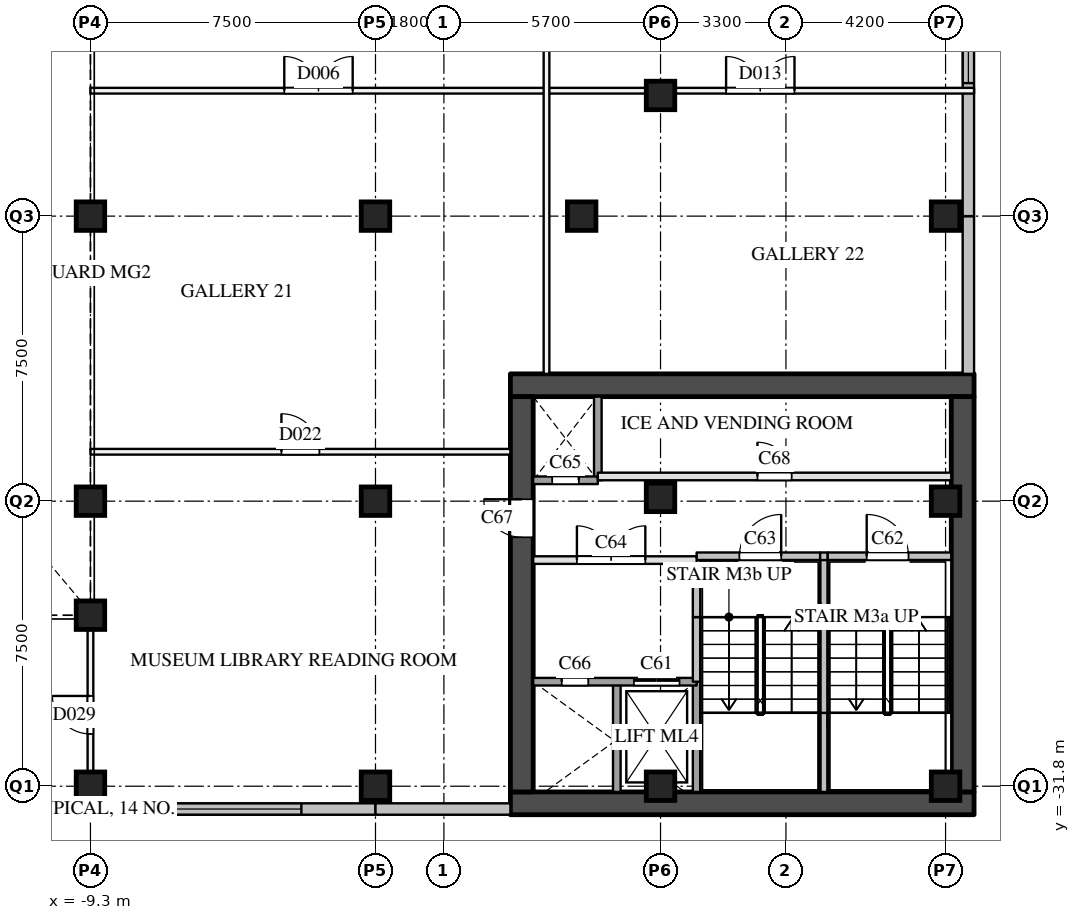
"""IFC4 building model, lengths in metres.
Left out: names, types, materials, properties, quantities, classifications, styles, units other than length and angle.
Written with IfcOpenShell. Run it as: python <this file> out.ifc"""

import sys

from ifc_helpers import new_model, si_unit, direction, frame, frame_2d, origin, origin_2d, place, context, subcontext, project, spatial, rectangle, extrude, element, fill, save


model = new_model("IFC4")
c1 = context("Model", 3, precision=1e-05, world=origin(), true_north=direction((0.0, 1.0)))
c2 = subcontext(c1, "Body", "Model", "MODEL_VIEW")
j1 = project(units=[si_unit("LENGTHUNIT", "METRE"), si_unit("PLANEANGLEUNIT", "RADIAN")], contexts=[c1])
p1 = place(None, origin())
s1 = spatial("IfcSite", under=j1, at=p1, CompositionType="ELEMENT")
p2 = place(p1, origin())
s2 = spatial("IfcBuilding", under=s1, at=p2, CompositionType="ELEMENT")
p3 = place(p2, frame((0.0, 0.0, 21.0)))
s3 = spatial("IfcBuildingStorey", under=s2, at=p3, CompositionType="ELEMENT", Elevation=21.0)
for number, where, z_axis, x_axis in (
    (1, (-9.3, -31.8, 0.0), (0.0, 0.0, 1.0), (1.0, 0.0, 0.0)),
    (2, (-9.3, -24.3, 0.0), (0.0, 0.0, 1.0), (1.0, 0.0, 0.0)),
    (3, (-9.3, -16.8, 0.0), (0.0, 0.0, 1.0), (1.0, 0.0, 0.0)),
    (4, (-1.8, -31.8, 0.0), (0.0, 0.0, 1.0), (1.0, 0.0, 0.0)),
    (5, (-1.8, -24.3, 0.0), (0.0, 0.0, 1.0), (1.0, 0.0, 0.0)),
    (6, (-1.8, -16.8, 0.0), (0.0, 0.0, 1.0), (1.0, 0.0, 0.0)),
    (7, (5.7, -31.8, 0.0), (0.0, 0.0, 1.0), (1.0, 0.0, 0.0)),
    (8, (5.7, -24.2, 0.0), (0.0, 0.0, 1.0), (1.0, 0.0, 0.0)),
    (9, (13.2, -31.8, 0.0), (0.0, 0.0, 1.0), (1.0, 0.0, 0.0)),
    (10, (13.2, -24.3, 0.0), (0.0, 0.0, 1.0), (1.0, 0.0, 0.0)),
    (11, (13.2, -16.8, 0.0), (0.0, 0.0, 1.0), (1.0, 0.0, 0.0)),
    (12, (-9.3, -27.3, 0.0), (0.0, 0.0, 1.0), (1.0, 0.0, 0.0)),
    (13, (3.625, -16.8, 0.0), (0.0, 0.0, 1.0), (1.0, 0.0, 0.0)),
    (14, (5.7, -13.625, 0.0), (0.0, 0.0, 1.0), (1.0, 0.0, 0.0)),
):
    element("IfcColumn", number, at=place(p3, frame(where, z_axis=z_axis, x_axis=x_axis)), inside=s3, PredefinedType="COLUMN", context=c2, shape_type="SweptSolid", body=[
        extrude(rectangle(XDim=0.75, YDim=0.75, at=origin_2d()), origin(), (0.0, 0.0, 1.0), 5.0),
    ])
p4 = place(p3, frame((-16.8, -32.4, 0.0), z_axis=(0.0, 0.0, 1.0), x_axis=(1.0, 0.0, 0.0)))
e15 = element("IfcWall", 15, at=p4, inside=s3, PredefinedType="SOLIDWALL", context=c2, shape_type="SweptSolid", body=[
    extrude(rectangle(XDim=7.5, YDim=0.3, at=frame_2d((3.75, 0.0))), origin(), (0.0, 0.0, 1.0), 4.59),
])
p5 = place(p4, frame((1.95, 0.0, 2.4)))
e16 = element("IfcOpeningElement", 16, at=p5, cuts=e15, PredefinedType="OPENING", context=c2, shape_type="SweptSolid", body=[
    extrude(rectangle(XDim=3.6, YDim=1.2, at=frame_2d((1.8, 0.6))), frame((0.0, 0.16, 0.0), z_axis=(0.0, -1.0, 0.0), x_axis=(1.0, 0.0, 0.0)), (0.0, 0.0, 1.0), 0.32),
])
p6 = place(p3, frame((-9.3, -32.4, 0.0), z_axis=(0.0, 0.0, 1.0), x_axis=(1.0, 0.0, 0.0)))
e17 = element("IfcWall", 17, at=p6, inside=s3, PredefinedType="SOLIDWALL", context=c2, shape_type="SweptSolid", body=[
    extrude(rectangle(XDim=7.5, YDim=0.3, at=frame_2d((3.75, 0.0))), origin(), (0.0, 0.0, 1.0), 4.59),
])
p7 = place(p6, frame((1.95, 0.0, 2.4)))
e18 = element("IfcOpeningElement", 18, at=p7, cuts=e17, PredefinedType="OPENING", context=c2, shape_type="SweptSolid", body=[
    extrude(rectangle(XDim=3.6, YDim=1.2, at=frame_2d((1.8, 0.6))), frame((0.0, 0.16, 0.0), z_axis=(0.0, -1.0, 0.0), x_axis=(1.0, 0.0, 0.0)), (0.0, 0.0, 1.0), 0.32),
])
p8 = place(p3, frame((-1.8, -32.4, 0.0), z_axis=(0.0, 0.0, 1.0), x_axis=(1.0, 0.0, 0.0)))
e19 = element("IfcWall", 19, at=p8, inside=s3, PredefinedType="SOLIDWALL", context=c2, shape_type="SweptSolid", body=[
    extrude(rectangle(XDim=3.55, YDim=0.3, at=frame_2d((1.775, 0.0))), origin(), (0.0, 0.0, 1.0), 4.59),
])
p9 = place(p3, frame((13.8, -20.95, 0.0), z_axis=(0.0, 0.0, 1.0), x_axis=(0.0, 1.0, 0.0)))
e20 = element("IfcWall", 20, at=p9, inside=s3, PredefinedType="SOLIDWALL", context=c2, shape_type="SweptSolid", body=[
    extrude(rectangle(XDim=4.15, YDim=0.3, at=frame_2d((2.075, 0.0))), origin(), (0.0, 0.0, 1.0), 4.59),
])
p10 = place(p3, frame((13.8, -16.8, 0.0), z_axis=(0.0, 0.0, 1.0), x_axis=(0.0, 1.0, 0.0)))
e21 = element("IfcWall", 21, at=p10, inside=s3, PredefinedType="SOLIDWALL", context=c2, shape_type="SweptSolid", body=[
    extrude(rectangle(XDim=7.5, YDim=0.3, at=frame_2d((3.75, 0.0))), origin(), (0.0, 0.0, 1.0), 4.59),
])
p11 = place(p10, frame((3.5, 0.0, 2.4)))
e22 = element("IfcOpeningElement", 22, at=p11, cuts=e21, PredefinedType="OPENING", context=c2, shape_type="SweptSolid", body=[
    extrude(rectangle(XDim=3.6, YDim=1.2, at=frame_2d((1.8, 0.6))), frame((0.0, 0.16, 0.0), z_axis=(0.0, -1.0, 0.0), x_axis=(1.0, 0.0, 0.0)), (0.0, 0.0, 1.0), 0.32),
])
for number, where, z_axis, x_axis in (
    (23, (1.75, -32.25, 0.0), (0.0, 0.0, 1.0), (1.0, 0.0, 0.0)),
    (24, (1.75, -21.25, 0.0), (0.0, 0.0, 1.0), (1.0, 0.0, 0.0)),
):
    element("IfcWall", number, at=place(p3, frame(where, z_axis=z_axis, x_axis=x_axis)), inside=s3, PredefinedType="SHEAR", context=c2, shape_type="SweptSolid", body=[
        extrude(rectangle(XDim=12.2, YDim=0.6, at=frame_2d((6.1, 0.0))), origin(), (0.0, 0.0, 1.0), 4.55),
    ])
p12 = place(p3, frame((2.05, -31.95, 0.0), z_axis=(0.0, 0.0, 1.0), x_axis=(0.0, 1.0, 0.0)))
e25 = element("IfcWall", 25, at=p12, inside=s3, PredefinedType="SHEAR", context=c2, shape_type="SweptSolid", body=[
    extrude(rectangle(XDim=10.4, YDim=0.6, at=frame_2d((5.2, 0.0))), origin(), (0.0, 0.0, 1.0), 4.55),
])
p13 = place(p12, frame((6.7, 0.0, 0.0)))
e26 = element("IfcOpeningElement", 26, at=p13, cuts=e25, PredefinedType="OPENING", context=c2, shape_type="SweptSolid", body=[
    extrude(rectangle(XDim=1.0, YDim=2.1, at=frame_2d((0.5, 1.05))), frame((0.0, 0.31, 0.0), z_axis=(0.0, -1.0, 0.0), x_axis=(1.0, 0.0, 0.0)), (0.0, 0.0, 1.0), 0.62),
])
p14 = place(p3, frame((13.65, -31.95, 0.0), z_axis=(0.0, 0.0, 1.0), x_axis=(0.0, 1.0, 0.0)))
e27 = element("IfcWall", 27, at=p14, inside=s3, PredefinedType="SHEAR", context=c2, shape_type="SweptSolid", body=[
    extrude(rectangle(XDim=10.4, YDim=0.6, at=frame_2d((5.2, 0.0))), origin(), (0.0, 0.0, 1.0), 4.55),
])
p15 = place(p3, frame((4.05, -23.75, 0.0), z_axis=(0.0, 0.0, 1.0), x_axis=(0.0, 1.0, 0.0)))
e28 = element("IfcWall", 28, at=p15, inside=s3, PredefinedType="SOLIDWALL", context=c2, shape_type="SweptSolid", body=[
    extrude(rectangle(XDim=2.2, YDim=0.2, at=frame_2d((1.1, 0.0))), origin(), (0.0, 0.0, 1.0), 4.55),
])
for number, where, z_axis, x_axis in (
    (29, (4.55, -31.95, 0.0), (0.0, 0.0, 1.0), (0.0, 1.0, 0.0)),
    (30, (6.65, -31.95, 0.0), (0.0, 0.0, 1.0), (0.0, 1.0, 0.0)),
):
    element("IfcWall", number, at=place(p3, frame(where, z_axis=z_axis, x_axis=x_axis)), inside=s3, PredefinedType="SOLIDWALL", context=c2, shape_type="SweptSolid", body=[
        extrude(rectangle(XDim=2.9, YDim=0.2, at=frame_2d((1.45, 0.0))), origin(), (0.0, 0.0, 1.0), 4.55),
    ])
p16 = place(p3, frame((6.65, -29.05, 0.0), z_axis=(0.0, 0.0, 1.0), x_axis=(0.0, 1.0, 0.0)))
e31 = element("IfcWall", 31, at=p16, inside=s3, PredefinedType="SOLIDWALL", context=c2, shape_type="SweptSolid", body=[
    extrude(rectangle(XDim=1.7, YDim=0.2, at=frame_2d((0.85, 0.0))), origin(), (0.0, 0.0, 1.0), 4.55),
])
p17 = place(p3, frame((6.65, -27.35, 0.0), z_axis=(0.0, 0.0, 1.0), x_axis=(0.0, 1.0, 0.0)))
e32 = element("IfcWall", 32, at=p17, inside=s3, PredefinedType="SOLIDWALL", context=c2, shape_type="SweptSolid", body=[
    extrude(rectangle(XDim=1.6, YDim=0.2, at=frame_2d((0.8, 0.0))), origin(), (0.0, 0.0, 1.0), 4.55),
])
p18 = place(p3, frame((10.0, -31.95, 0.0), z_axis=(0.0, 0.0, 1.0), x_axis=(0.0, 1.0, 0.0)))
e33 = element("IfcWall", 33, at=p18, inside=s3, PredefinedType="SOLIDWALL", context=c2, shape_type="SweptSolid", body=[
    extrude(rectangle(XDim=2.08, YDim=0.2, at=frame_2d((1.04, 0.0))), origin(), (0.0, 0.0, 1.0), 4.55),
])
p19 = place(p3, frame((10.0, -29.87, 0.0), z_axis=(0.0, 0.0, 1.0), x_axis=(0.0, 1.0, 0.0)))
e34 = element("IfcWall", 34, at=p19, inside=s3, PredefinedType="SOLIDWALL", context=c2, shape_type="SweptSolid", body=[
    extrude(rectangle(XDim=2.52, YDim=0.2, at=frame_2d((1.26, 0.0))), origin(), (0.0, 0.0, 1.0), 4.55),
])
p20 = place(p3, frame((10.0, -27.35, 0.0), z_axis=(0.0, 0.0, 1.0), x_axis=(0.0, 1.0, 0.0)))
e35 = element("IfcWall", 35, at=p20, inside=s3, PredefinedType="SOLIDWALL", context=c2, shape_type="SweptSolid", body=[
    extrude(rectangle(XDim=1.6, YDim=0.2, at=frame_2d((0.8, 0.0))), origin(), (0.0, 0.0, 1.0), 4.55),
])
p21 = place(p3, frame((2.35, -29.05, 0.0), z_axis=(0.0, 0.0, 1.0), x_axis=(1.0, 0.0, 0.0)))
e36 = element("IfcWall", 36, at=p21, inside=s3, PredefinedType="SOLIDWALL", context=c2, shape_type="SweptSolid", body=[
    extrude(rectangle(XDim=4.3, YDim=0.2, at=frame_2d((2.15, 0.0))), origin(), (0.0, 0.0, 1.0), 4.55),
])
p22 = place(p21, frame((2.65, 0.0, 0.0)))
e37 = element("IfcOpeningElement", 37, at=p22, cuts=e36, PredefinedType="OPENING", context=c2, shape_type="SweptSolid", body=[
    extrude(rectangle(XDim=1.2, YDim=2.1, at=frame_2d((0.6, 1.05))), frame((0.0, 0.11, 0.0), z_axis=(0.0, -1.0, 0.0), x_axis=(1.0, 0.0, 0.0)), (0.0, 0.0, 1.0), 0.22),
])
p23 = place(p21, frame((0.75, 0.0, 0.0)))
e38 = element("IfcOpeningElement", 38, at=p23, cuts=e36, PredefinedType="OPENING", context=c2, shape_type="SweptSolid", body=[
    extrude(rectangle(XDim=0.7, YDim=2.1, at=frame_2d((0.35, 1.05))), frame((0.0, 0.11, 0.0), z_axis=(0.0, -1.0, 0.0), x_axis=(1.0, 0.0, 0.0)), (0.0, 0.0, 1.0), 0.22),
])
p24 = place(p3, frame((2.35, -25.85, 0.0), z_axis=(0.0, 0.0, 1.0), x_axis=(1.0, 0.0, 0.0)))
e39 = element("IfcWall", 39, at=p24, inside=s3, PredefinedType="PARTITIONING", context=c2, shape_type="SweptSolid", body=[
    extrude(rectangle(XDim=4.3, YDim=0.2, at=frame_2d((2.15, 0.0))), origin(), (0.0, 0.0, 1.0), 4.55),
])
p25 = place(p24, frame((1.15, 0.0, 0.0)))
e40 = element("IfcOpeningElement", 40, at=p25, cuts=e39, PredefinedType="OPENING", context=c2, shape_type="SweptSolid", body=[
    extrude(rectangle(XDim=1.8, YDim=2.1, at=frame_2d((0.9, 1.05))), frame((0.0, 0.11, 0.0), z_axis=(0.0, -1.0, 0.0), x_axis=(1.0, 0.0, 0.0)), (0.0, 0.0, 1.0), 0.22),
])
p26 = place(p3, frame((6.65, -25.75, 0.0), z_axis=(0.0, 0.0, 1.0), x_axis=(1.0, 0.0, 0.0)))
e41 = element("IfcWall", 41, at=p26, inside=s3, PredefinedType="SOLIDWALL", context=c2, shape_type="SweptSolid", body=[
    extrude(rectangle(XDim=3.25, YDim=0.2, at=frame_2d((1.625, 0.0))), origin(), (0.0, 0.0, 1.0), 4.55),
])
p27 = place(p26, frame((1.125, 0.0, 0.0)))
e42 = element("IfcOpeningElement", 42, at=p27, cuts=e41, PredefinedType="OPENING", context=c2, shape_type="SweptSolid", body=[
    extrude(rectangle(XDim=1.1, YDim=2.1, at=frame_2d((0.55, 1.05))), frame((0.0, 0.11, 0.0), z_axis=(0.0, -1.0, 0.0), x_axis=(1.0, 0.0, 0.0)), (0.0, 0.0, 1.0), 0.22),
])
p28 = place(p3, frame((9.9, -25.75, 0.0), z_axis=(0.0, 0.0, 1.0), x_axis=(1.0, 0.0, 0.0)))
e43 = element("IfcWall", 43, at=p28, inside=s3, PredefinedType="SOLIDWALL", context=c2, shape_type="SweptSolid", body=[
    extrude(rectangle(XDim=0.2, YDim=0.2, at=frame_2d((0.1, 0.0))), origin(), (0.0, 0.0, 1.0), 4.55),
])
p29 = place(p3, frame((10.1, -25.75, 0.0), z_axis=(0.0, 0.0, 1.0), x_axis=(1.0, 0.0, 0.0)))
e44 = element("IfcWall", 44, at=p29, inside=s3, PredefinedType="SOLIDWALL", context=c2, shape_type="SweptSolid", body=[
    extrude(rectangle(XDim=3.25, YDim=0.2, at=frame_2d((1.625, 0.0))), origin(), (0.0, 0.0, 1.0), 4.55),
])
p30 = place(p29, frame((1.025, 0.0, 0.0)))
e45 = element("IfcOpeningElement", 45, at=p30, cuts=e44, PredefinedType="OPENING", context=c2, shape_type="SweptSolid", body=[
    extrude(rectangle(XDim=1.1, YDim=2.1, at=frame_2d((0.55, 1.05))), frame((0.0, 0.11, 0.0), z_axis=(0.0, -1.0, 0.0), x_axis=(1.0, 0.0, 0.0)), (0.0, 0.0, 1.0), 0.22),
])
p31 = place(p3, frame((4.05, -23.65, 0.0), z_axis=(0.0, 0.0, 1.0), x_axis=(1.0, 0.0, 0.0)))
e46 = element("IfcWall", 46, at=p31, inside=s3, PredefinedType="PARTITIONING", context=c2, shape_type="SweptSolid", body=[
    extrude(rectangle(XDim=9.3, YDim=0.2, at=frame_2d((4.65, 0.0))), origin(), (0.0, 0.0, 1.0), 4.55),
])
p32 = place(p31, frame((4.2, 0.0, 0.0)))
e47 = element("IfcOpeningElement", 47, at=p32, cuts=e46, PredefinedType="OPENING", context=c2, shape_type="SweptSolid", body=[
    extrude(rectangle(XDim=0.9, YDim=2.1, at=frame_2d((0.45, 1.05))), frame((0.0, 0.11, 0.0), z_axis=(0.0, -1.0, 0.0), x_axis=(1.0, 0.0, 0.0)), (0.0, 0.0, 1.0), 0.22),
])
p33 = place(p3, frame((2.35, -23.75, 0.0), z_axis=(0.0, 0.0, 1.0), x_axis=(1.0, 0.0, 0.0)))
e48 = element("IfcWall", 48, at=p33, inside=s3, PredefinedType="SOLIDWALL", context=c2, shape_type="SweptSolid", body=[
    extrude(rectangle(XDim=1.7, YDim=0.2, at=frame_2d((0.85, 0.0))), origin(), (0.0, 0.0, 1.0), 4.55),
])
p34 = place(p33, frame((0.5, 0.0, 0.0)))
e49 = element("IfcOpeningElement", 49, at=p34, cuts=e48, PredefinedType="OPENING", context=c2, shape_type="SweptSolid", body=[
    extrude(rectangle(XDim=0.7, YDim=2.1, at=frame_2d((0.35, 1.05))), frame((0.0, 0.11, 0.0), z_axis=(0.0, -1.0, 0.0), x_axis=(1.0, 0.0, 0.0)), (0.0, 0.0, 1.0), 0.22),
])
p35 = place(p3, frame((-9.3, -13.5, 0.0), z_axis=(0.0, 0.0, 1.0), x_axis=(1.0, 0.0, 0.0)))
e50 = element("IfcWall", 50, at=p35, inside=s3, PredefinedType="PARTITIONING", context=c2, shape_type="SweptSolid", body=[
    extrude(rectangle(XDim=23.25, YDim=0.15, at=frame_2d((11.625, 0.0))), origin(), (0.0, 0.0, 1.0), 3.79),
])
p36 = place(p35, frame((5.1, 0.0, 0.0)))
e51 = element("IfcOpeningElement", 51, at=p36, cuts=e50, PredefinedType="OPENING", context=c2, shape_type="SweptSolid", body=[
    extrude(rectangle(XDim=1.8, YDim=2.1, at=frame_2d((0.9, 1.05))), frame((0.0, 0.085, 0.0), z_axis=(0.0, -1.0, 0.0), x_axis=(1.0, 0.0, 0.0)), (0.0, 0.0, 1.0), 0.17),
])
p37 = place(p35, frame((16.725, 0.0, 0.0)))
e52 = element("IfcOpeningElement", 52, at=p37, cuts=e50, PredefinedType="OPENING", context=c2, shape_type="SweptSolid", body=[
    extrude(rectangle(XDim=1.8, YDim=2.1, at=frame_2d((0.9, 1.05))), frame((0.0, 0.085, 0.0), z_axis=(0.0, -1.0, 0.0), x_axis=(1.0, 0.0, 0.0)), (0.0, 0.0, 1.0), 0.17),
])
p38 = place(p3, frame((2.7, -20.95, 0.0), z_axis=(0.0, 0.0, 1.0), x_axis=(0.0, 1.0, 0.0)))
e53 = element("IfcWall", 53, at=p38, inside=s3, PredefinedType="PARTITIONING", context=c2, shape_type="SweptSolid", body=[
    extrude(rectangle(XDim=16.9, YDim=0.15, at=frame_2d((8.45, 0.0))), origin(), (0.0, 0.0, 1.0), 3.79),
])
p39 = place(p3, frame((-9.3, -23.0, 0.0), z_axis=(0.0, 0.0, 1.0), x_axis=(1.0, 0.0, 0.0)))
e54 = element("IfcWall", 54, at=p39, inside=s3, PredefinedType="PARTITIONING", context=c2, shape_type="SweptSolid", body=[
    extrude(rectangle(XDim=11.05, YDim=0.15, at=frame_2d((5.525, 0.0))), origin(), (0.0, 0.0, 1.0), 3.79),
])
p40 = place(p39, frame((5.025, 0.0, 0.0)))
e55 = element("IfcOpeningElement", 55, at=p40, cuts=e54, PredefinedType="OPENING", context=c2, shape_type="SweptSolid", body=[
    extrude(rectangle(XDim=1.0, YDim=2.1, at=frame_2d((0.5, 1.05))), frame((0.0, 0.085, 0.0), z_axis=(0.0, -1.0, 0.0), x_axis=(1.0, 0.0, 0.0)), (0.0, 0.0, 1.0), 0.17),
])
p41 = place(p3, frame((-9.3, -32.55, 0.0), z_axis=(0.0, 0.0, 1.0), x_axis=(0.0, 1.0, 0.0)))
e56 = element("IfcWall", 56, at=p41, inside=s3, PredefinedType="PARTITIONING", context=c2, shape_type="SweptSolid", body=[
    extrude(rectangle(XDim=5.25, YDim=0.15, at=frame_2d((2.625, 0.0))), origin(), (0.0, 0.0, 1.0), 3.79),
])
p42 = place(p41, frame((2.125, 0.0, 0.0)))
e57 = element("IfcOpeningElement", 57, at=p42, cuts=e56, PredefinedType="OPENING", context=c2, shape_type="SweptSolid", body=[
    extrude(rectangle(XDim=1.0, YDim=2.1, at=frame_2d((0.5, 1.05))), frame((0.0, 0.085, 0.0), z_axis=(0.0, -1.0, 0.0), x_axis=(1.0, 0.0, 0.0)), (0.0, 0.0, 1.0), 0.17),
])
p43 = place(p7, origin())
e58 = element("IfcWindow", 58, at=p43, inside=s3, PartitioningType="SINGLE_PANEL", PredefinedType="WINDOW", context=c2, shape_type="SweptSolid", body=[
    extrude(rectangle(XDim=3.6, YDim=1.2, at=frame_2d((1.8, 0.6))), frame((0.0, 0.03, 0.0), z_axis=(0.0, -1.0, 0.0), x_axis=(1.0, 0.0, 0.0)), (0.0, 0.0, 1.0), 0.06),
])
fill(e18, e58)
p44 = place(p11, origin())
e59 = element("IfcWindow", 59, at=p44, inside=s3, PartitioningType="SINGLE_PANEL", PredefinedType="WINDOW", context=c2, shape_type="SweptSolid", body=[
    extrude(rectangle(XDim=3.6, YDim=1.2, at=frame_2d((1.8, 0.6))), frame((0.0, 0.03, 0.0), z_axis=(0.0, -1.0, 0.0), x_axis=(1.0, 0.0, 0.0)), (0.0, 0.0, 1.0), 0.06),
])
fill(e22, e59)
p45 = place(p22, origin())
e60 = element("IfcDoor", 60, at=p45, inside=s3, OperationType="SLIDING_TO_LEFT", PredefinedType="DOOR", context=c2, shape_type="SweptSolid", body=[
    extrude(rectangle(XDim=1.2, YDim=2.1, at=frame_2d((0.6, 1.05))), frame((0.0, 0.025, 0.0), z_axis=(0.0, -1.0, 0.0), x_axis=(1.0, 0.0, 0.0)), (0.0, 0.0, 1.0), 0.05),
])
fill(e37, e60)
p46 = place(p30, origin())
e61 = element("IfcDoor", 61, at=p46, inside=s3, OperationType="SINGLE_SWING_LEFT", PredefinedType="DOOR", context=c2, shape_type="SweptSolid", body=[
    extrude(rectangle(XDim=1.1, YDim=2.1, at=frame_2d((0.55, 1.05))), frame((0.0, 0.025, 0.0), z_axis=(0.0, -1.0, 0.0), x_axis=(1.0, 0.0, 0.0)), (0.0, 0.0, 1.0), 0.05),
])
fill(e45, e61)
p47 = place(p27, origin())
e62 = element("IfcDoor", 62, at=p47, inside=s3, OperationType="SINGLE_SWING_RIGHT", PredefinedType="DOOR", context=c2, shape_type="SweptSolid", body=[
    extrude(rectangle(XDim=1.1, YDim=2.1, at=frame_2d((0.55, 1.05))), frame((0.0, 0.025, 0.0), z_axis=(0.0, -1.0, 0.0), x_axis=(1.0, 0.0, 0.0)), (0.0, 0.0, 1.0), 0.05),
])
fill(e42, e62)
p48 = place(p25, origin())
e63 = element("IfcDoor", 63, at=p48, inside=s3, OperationType="DOUBLE_DOOR_SINGLE_SWING", PredefinedType="DOOR", context=c2, shape_type="SweptSolid", body=[
    extrude(rectangle(XDim=1.8, YDim=2.1, at=frame_2d((0.9, 1.05))), frame((0.0, 0.025, 0.0), z_axis=(0.0, -1.0, 0.0), x_axis=(1.0, 0.0, 0.0)), (0.0, 0.0, 1.0), 0.05),
])
fill(e40, e63)
p49 = place(p34, origin())
e64 = element("IfcDoor", 64, at=p49, inside=s3, OperationType="SINGLE_SWING_RIGHT", PredefinedType="DOOR", context=c2, shape_type="SweptSolid", body=[
    extrude(rectangle(XDim=0.7, YDim=2.1, at=frame_2d((0.35, 1.05))), frame((0.0, 0.025, 0.0), z_axis=(0.0, -1.0, 0.0), x_axis=(1.0, 0.0, 0.0)), (0.0, 0.0, 1.0), 0.05),
])
fill(e49, e64)
p50 = place(p23, origin())
e65 = element("IfcDoor", 65, at=p50, inside=s3, OperationType="SINGLE_SWING_LEFT", PredefinedType="DOOR", context=c2, shape_type="SweptSolid", body=[
    extrude(rectangle(XDim=0.7, YDim=2.1, at=frame_2d((0.35, 1.05))), frame((0.0, 0.025, 0.0), z_axis=(0.0, -1.0, 0.0), x_axis=(1.0, 0.0, 0.0)), (0.0, 0.0, 1.0), 0.05),
])
fill(e38, e65)
p51 = place(p13, origin())
e66 = element("IfcDoor", 66, at=p51, inside=s3, OperationType="SINGLE_SWING_RIGHT", PredefinedType="DOOR", context=c2, shape_type="SweptSolid", body=[
    extrude(rectangle(XDim=1.0, YDim=2.1, at=frame_2d((0.5, 1.05))), frame((0.0, 0.025, 0.0), z_axis=(0.0, -1.0, 0.0), x_axis=(1.0, 0.0, 0.0)), (0.0, 0.0, 1.0), 0.05),
])
fill(e26, e66)
p52 = place(p32, origin())
e67 = element("IfcDoor", 67, at=p52, inside=s3, OperationType="SINGLE_SWING_LEFT", PredefinedType="DOOR", context=c2, shape_type="SweptSolid", body=[
    extrude(rectangle(XDim=0.9, YDim=2.1, at=frame_2d((0.45, 1.05))), frame((0.0, 0.025, 0.0), z_axis=(0.0, -1.0, 0.0), x_axis=(1.0, 0.0, 0.0)), (0.0, 0.0, 1.0), 0.05),
])
fill(e47, e67)
p53 = place(p36, origin())
e68 = element("IfcDoor", 68, at=p53, inside=s3, OperationType="DOUBLE_DOOR_SINGLE_SWING", PredefinedType="DOOR", context=c2, shape_type="SweptSolid", body=[
    extrude(rectangle(XDim=1.8, YDim=2.1, at=frame_2d((0.9, 1.05))), frame((0.0, 0.025, 0.0), z_axis=(0.0, -1.0, 0.0), x_axis=(1.0, 0.0, 0.0)), (0.0, 0.0, 1.0), 0.05),
])
fill(e51, e68)
p54 = place(p37, origin())
e69 = element("IfcDoor", 69, at=p54, inside=s3, OperationType="DOUBLE_DOOR_SINGLE_SWING", PredefinedType="DOOR", context=c2, shape_type="SweptSolid", body=[
    extrude(rectangle(XDim=1.8, YDim=2.1, at=frame_2d((0.9, 1.05))), frame((0.0, 0.025, 0.0), z_axis=(0.0, -1.0, 0.0), x_axis=(1.0, 0.0, 0.0)), (0.0, 0.0, 1.0), 0.05),
])
fill(e52, e69)
p55 = place(p40, origin())
e70 = element("IfcDoor", 70, at=p55, inside=s3, OperationType="SINGLE_SWING_LEFT", PredefinedType="DOOR", context=c2, shape_type="SweptSolid", body=[
    extrude(rectangle(XDim=1.0, YDim=2.1, at=frame_2d((0.5, 1.05))), frame((0.0, 0.025, 0.0), z_axis=(0.0, -1.0, 0.0), x_axis=(1.0, 0.0, 0.0)), (0.0, 0.0, 1.0), 0.05),
])
fill(e55, e70)
p56 = place(p42, origin())
e71 = element("IfcDoor", 71, at=p56, inside=s3, OperationType="SINGLE_SWING_RIGHT", PredefinedType="DOOR", context=c2, shape_type="SweptSolid", body=[
    extrude(rectangle(XDim=1.0, YDim=2.1, at=frame_2d((0.5, 1.05))), frame((0.0, 0.025, 0.0), z_axis=(0.0, -1.0, 0.0), x_axis=(1.0, 0.0, 0.0)), (0.0, 0.0, 1.0), 0.05),
])
fill(e57, e71)
save(model, sys.argv[1])
